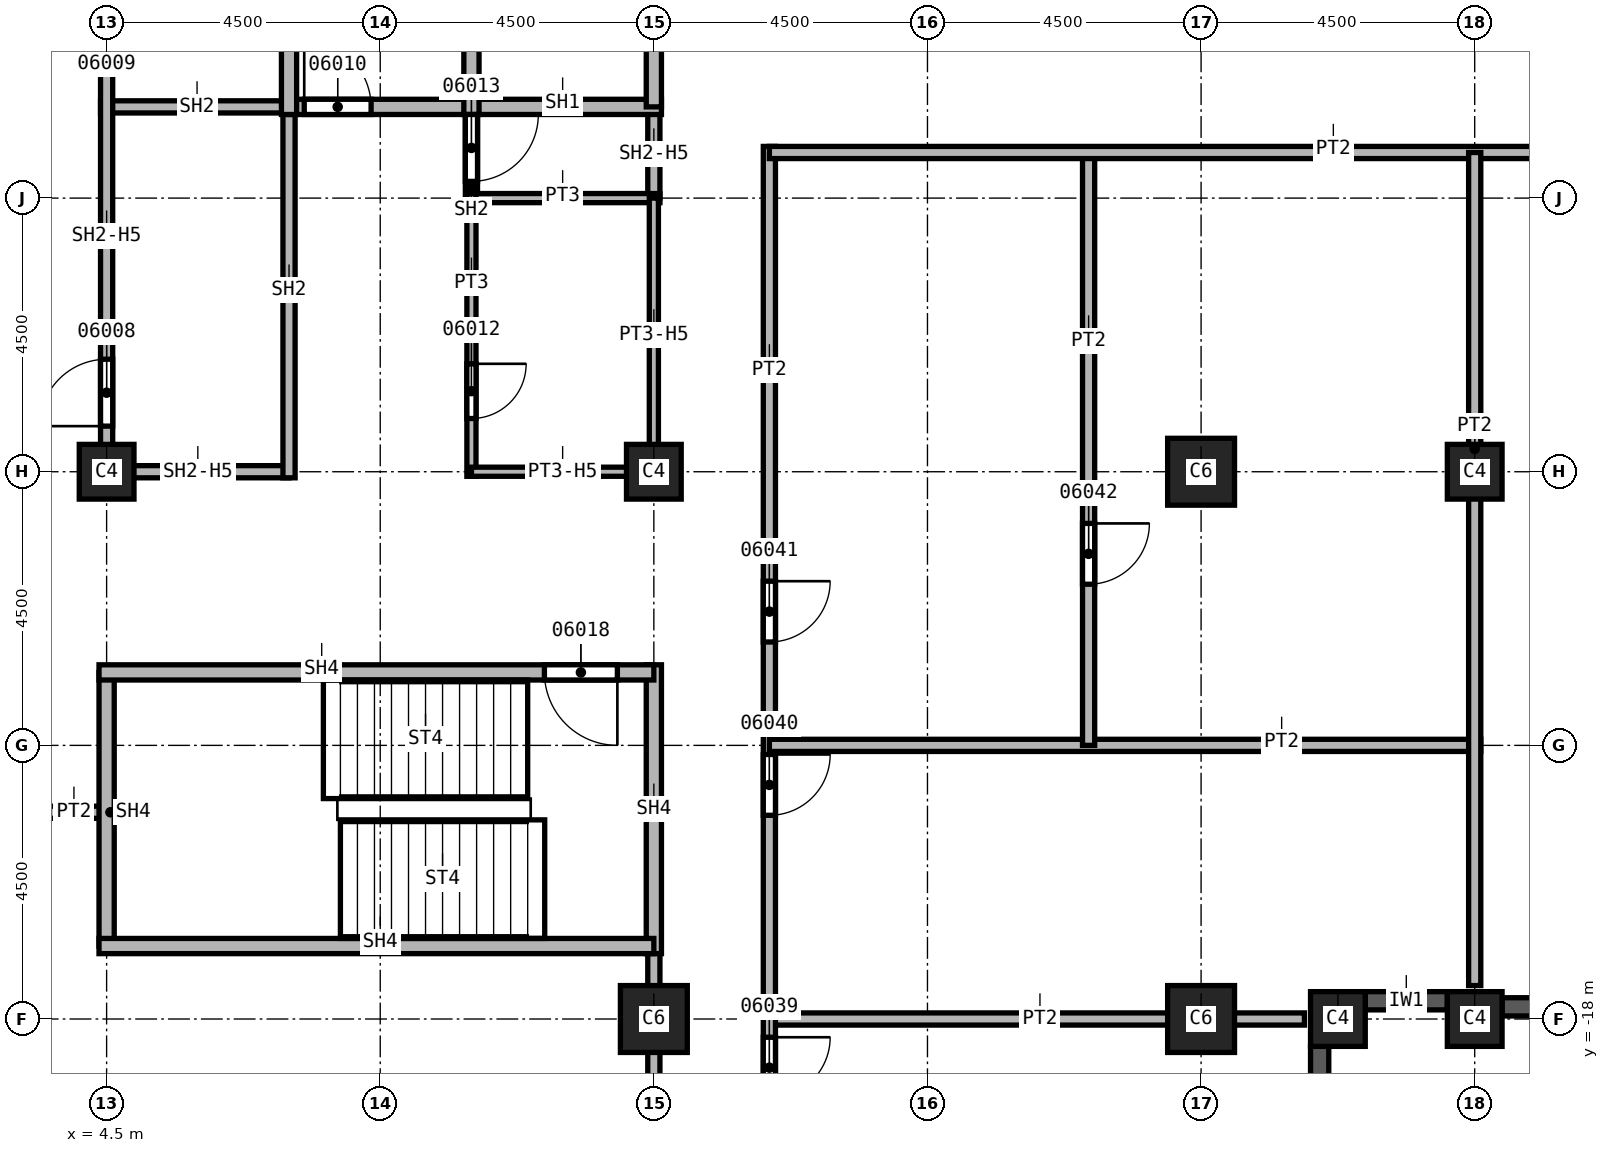
"""IFC4 building model, lengths in metres.
Left out: names, types, materials, properties, quantities, classifications, styles, units other than length and angle.
Written with IfcOpenShell. Run it as: python <this file> out.ifc"""

import sys

from ifc_helpers import new_model, si_unit, direction, frame, frame_2d, origin, origin_2d, place, context, subcontext, project, spatial, rectangle, extrude, element, fill, save


model = new_model("IFC4")
c1 = context("Model", 3, precision=1e-05, world=origin(), true_north=direction((0.0, 1.0)))
c2 = subcontext(c1, "Body", "Model", "MODEL_VIEW")
j1 = project(units=[si_unit("LENGTHUNIT", "METRE"), si_unit("PLANEANGLEUNIT", "RADIAN")], contexts=[c1])
p1 = place(None, origin())
s1 = spatial("IfcSite", under=j1, at=p1, CompositionType="ELEMENT")
p2 = place(p1, origin())
s2 = spatial("IfcBuilding", under=s1, at=p2, CompositionType="ELEMENT")
p3 = place(p2, frame((0.0, 0.0, 130.0)))
s3 = spatial("IfcBuildingStorey", under=s2, at=p3, CompositionType="ELEMENT", Elevation=130.0)
for number, where, z_axis, x_axis in (
    (1, (13.5, -18.0, 0.0), (0.0, 0.0, 1.0), (1.0, 0.0, 0.0)),
    (2, (22.5, -9.0, 0.0), (0.0, 0.0, 1.0), (1.0, 0.0, 0.0)),
    (3, (22.5, -18.0, 0.0), (0.0, 0.0, 1.0), (1.0, 0.0, 0.0)),
):
    element("IfcColumn", number, at=place(p3, frame(where, z_axis=z_axis, x_axis=x_axis)), inside=s3, PredefinedType="COLUMN", context=c2, shape_type="SweptSolid", body=[
        extrude(rectangle(XDim=1.1, YDim=1.1, at=origin_2d()), origin(), (0.0, 0.0, 1.0), 3.7),
    ])
for number, where, z_axis, x_axis in (
    (4, (4.5, -9.0, 0.0), (0.0, 0.0, 1.0), (1.0, 0.0, 0.0)),
    (5, (13.5, -9.0, 0.0), (0.0, 0.0, 1.0), (1.0, 0.0, 0.0)),
    (6, (27.0, -9.0, 0.0), (0.0, 0.0, 1.0), (1.0, 0.0, 0.0)),
    (7, (27.0, -18.0, 0.0), (0.0, 0.0, 1.0), (1.0, 0.0, 0.0)),
    (8, (24.75, -18.0, 0.0), (0.0, 0.0, 1.0), (1.0, 0.0, 0.0)),
):
    element("IfcColumn", number, at=place(p3, frame(where, z_axis=z_axis, x_axis=x_axis)), inside=s3, PredefinedType="COLUMN", context=c2, shape_type="SweptSolid", body=[
        extrude(rectangle(XDim=0.9, YDim=0.9, at=origin_2d()), origin(), (0.0, 0.0, 1.0), 3.7),
    ])
p4 = place(p3, frame((24.45, -20.35, 0.0), z_axis=(0.0, 0.0, 1.0), x_axis=(0.0, 1.0, 0.0)))
e9 = element("IfcWall", 9, at=p4, inside=s3, PredefinedType="SOLIDWALL", context=c2, shape_type="SweptSolid", body=[
    extrude(rectangle(XDim=1.9, YDim=0.3, at=frame_2d((0.95, 0.0))), origin(), (0.0, 0.0, 1.0), 3.1),
])
p5 = place(p3, frame((25.2, -17.7, 0.0), z_axis=(0.0, 0.0, 1.0), x_axis=(1.0, 0.0, 0.0)))
e10 = element("IfcWall", 10, at=p5, inside=s3, PredefinedType="SOLIDWALL", context=c2, shape_type="SweptSolid", body=[
    extrude(rectangle(XDim=1.35, YDim=0.3, at=frame_2d((0.675, 0.0))), origin(), (0.0, 0.0, 1.0), 3.1),
])
p6 = place(p3, frame((27.45, -17.8, 0.0), z_axis=(0.0, 0.0, 1.0), x_axis=(1.0, 0.0, 0.0)))
e11 = element("IfcWall", 11, at=p6, inside=s3, PredefinedType="SOLIDWALL", context=c2, shape_type="SweptSolid", body=[
    extrude(rectangle(XDim=3.6, YDim=0.3, at=frame_2d((1.8, 0.0))), origin(), (0.0, 0.0, 1.0), 3.1),
])
p7 = place(p6, frame((0.6, 0.0, 0.8)))
e12 = element("IfcOpeningElement", 12, at=p7, cuts=e11, PredefinedType="OPENING", context=c2, shape_type="SweptSolid", body=[
    extrude(rectangle(XDim=2.4, YDim=1.95, at=frame_2d((1.2, 0.975))), frame((0.0, 0.15, 0.0), z_axis=(0.0, -1.0, 0.0), x_axis=(1.0, 0.0, 0.0)), (0.0, 0.0, 1.0), 0.3),
])
p8 = place(p3, frame((4.5, -14.6, 0.0), z_axis=(0.0, 0.0, 1.0), x_axis=(-1.0, 0.0, 0.0)))
e13 = element("IfcWall", 13, at=p8, inside=s3, PredefinedType="PARTITIONING", context=c2, shape_type="SweptSolid", body=[
    extrude(rectangle(XDim=0.95, YDim=0.2, at=frame_2d((0.475, 0.0))), origin(), (0.0, 0.0, 1.0), 3.7),
])
p9 = place(p3, frame((13.5, -23.05, 0.0), z_axis=(0.0, 0.0, 1.0), x_axis=(0.0, 1.0, 0.0)))
e14 = element("IfcWall", 14, at=p9, inside=s3, PredefinedType="PARTITIONING", context=c2, shape_type="SweptSolid", body=[
    extrude(rectangle(XDim=6.375, YDim=0.2, at=frame_2d((3.188, 0.0))), origin(), (0.0, 0.0, 1.0), 3.7),
])
p10 = place(p9, frame((0.25, 0.0, 0.0)))
e15 = element("IfcOpeningElement", 15, at=p10, cuts=e14, PredefinedType="OPENING", context=c2, shape_type="SweptSolid", body=[
    extrude(rectangle(XDim=1.0, YDim=2.1, at=frame_2d((0.5, 1.05))), frame((0.0, 0.1, 0.0), z_axis=(0.0, -1.0, 0.0), x_axis=(1.0, 0.0, 0.0)), (0.0, 0.0, 1.0), 0.2),
])
p11 = place(p3, frame((15.4, -18.0, 0.0), z_axis=(0.0, 0.0, 1.0), x_axis=(1.0, 0.0, 0.0)))
e16 = element("IfcWall", 16, at=p11, inside=s3, PredefinedType="PARTITIONING", context=c2, shape_type="SweptSolid", body=[
    extrude(rectangle(XDim=8.8, YDim=0.2, at=frame_2d((4.4, 0.0))), origin(), (0.0, 0.0, 1.0), 3.7),
])
p12 = place(p3, frame((15.4, -3.65, 0.0), z_axis=(0.0, 0.0, 1.0), x_axis=(0.0, -1.0, 0.0)))
e17 = element("IfcWall", 17, at=p12, inside=s3, PredefinedType="PARTITIONING", context=c2, shape_type="SweptSolid", body=[
    extrude(rectangle(XDim=19.6, YDim=0.2, at=frame_2d((9.8, 0.0))), origin(), (0.0, 0.0, 1.0), 3.7),
])
p13 = place(p12, frame((14.65, 0.0, 0.0)))
e18 = element("IfcOpeningElement", 18, at=p13, cuts=e17, PredefinedType="OPENING", context=c2, shape_type="SweptSolid", body=[
    extrude(rectangle(XDim=1.0, YDim=2.1, at=frame_2d((0.5, 1.05))), frame((0.0, 0.1, 0.0), z_axis=(0.0, -1.0, 0.0), x_axis=(1.0, 0.0, 0.0)), (0.0, 0.0, 1.0), 0.2),
])
p14 = place(p12, frame((10.0, 0.0, 0.0)))
e19 = element("IfcOpeningElement", 19, at=p14, cuts=e17, PredefinedType="OPENING", context=c2, shape_type="SweptSolid", body=[
    extrude(rectangle(XDim=1.0, YDim=2.1, at=frame_2d((0.5, 1.05))), frame((0.0, 0.1, 0.0), z_axis=(0.0, -1.0, 0.0), x_axis=(1.0, 0.0, 0.0)), (0.0, 0.0, 1.0), 0.2),
])
p15 = place(p12, frame((7.15, 0.0, 0.0)))
e20 = element("IfcOpeningElement", 20, at=p15, cuts=e17, PredefinedType="OPENING", context=c2, shape_type="SweptSolid", body=[
    extrude(rectangle(XDim=1.0, YDim=2.1, at=frame_2d((0.5, 1.05))), frame((0.0, 0.1, 0.0), z_axis=(0.0, -1.0, 0.0), x_axis=(1.0, 0.0, 0.0)), (0.0, 0.0, 1.0), 0.2),
])
p16 = place(p3, frame((15.4, -13.5, 0.0), z_axis=(0.0, 0.0, 1.0), x_axis=(1.0, 0.0, 0.0)))
e21 = element("IfcWall", 21, at=p16, inside=s3, PredefinedType="PARTITIONING", context=c2, shape_type="SweptSolid", body=[
    extrude(rectangle(XDim=11.7, YDim=0.2, at=frame_2d((5.85, 0.0))), origin(), (0.0, 0.0, 1.0), 3.7),
])
p17 = place(p3, frame((20.65, -3.75, 0.0), z_axis=(0.0, 0.0, 1.0), x_axis=(0.0, -1.0, 0.0)))
e22 = element("IfcWall", 22, at=p17, inside=s3, PredefinedType="PARTITIONING", context=c2, shape_type="SweptSolid", body=[
    extrude(rectangle(XDim=9.75, YDim=0.2, at=frame_2d((4.875, 0.0))), origin(), (0.0, 0.0, 1.0), 3.7),
])
p18 = place(p17, frame((6.1, 0.0, 0.0)))
e23 = element("IfcOpeningElement", 23, at=p18, cuts=e22, PredefinedType="OPENING", context=c2, shape_type="SweptSolid", body=[
    extrude(rectangle(XDim=1.0, YDim=2.1, at=frame_2d((0.5, 1.05))), frame((0.0, 0.1, 0.0), z_axis=(0.0, -1.0, 0.0), x_axis=(1.0, 0.0, 0.0)), (0.0, 0.0, 1.0), 0.2),
])
p19 = place(p3, frame((33.85, -3.75, 0.0), z_axis=(0.0, 0.0, 1.0), x_axis=(-1.0, 0.0, 0.0)))
e24 = element("IfcWall", 24, at=p19, inside=s3, PredefinedType="PARTITIONING", context=c2, shape_type="SweptSolid", body=[
    extrude(rectangle(XDim=18.45, YDim=0.2, at=frame_2d((9.225, 0.0))), origin(), (0.0, 0.0, 1.0), 3.7),
])
p20 = place(p3, frame((27.0, -3.75, 0.0), z_axis=(0.0, 0.0, 1.0), x_axis=(0.0, -1.0, 0.0)))
e25 = element("IfcWall", 25, at=p20, inside=s3, PredefinedType="PARTITIONING", context=c2, shape_type="SweptSolid", body=[
    extrude(rectangle(XDim=13.7, YDim=0.2, at=frame_2d((6.85, 0.0))), origin(), (0.0, 0.0, 1.0), 3.7),
])
p21 = place(p3, frame((4.4, -3.0, 0.0), z_axis=(0.0, 0.0, 1.0), x_axis=(1.0, 0.0, 0.0)))
e26 = element("IfcWall", 26, at=p21, inside=s3, PredefinedType="SOLIDWALL", context=c2, shape_type="SweptSolid", body=[
    extrude(rectangle(XDim=3.225, YDim=0.2, at=frame_2d((1.613, 0.0))), origin(), (0.0, 0.0, 1.0), 3.7),
])
p22 = place(p3, frame((4.5, -9.1, 0.0), z_axis=(0.0, 0.0, 1.0), x_axis=(0.0, 1.0, 0.0)))
e27 = element("IfcWall", 27, at=p22, inside=s3, PredefinedType="SOLIDWALL", context=c2, shape_type="SweptSolid", body=[
    extrude(rectangle(XDim=9.1, YDim=0.2, at=frame_2d((4.55, 0.0))), origin(), (0.0, 0.0, 1.0), 2.938),
])
p23 = place(p22, frame((0.85, 0.0, 0.0)))
e28 = element("IfcOpeningElement", 28, at=p23, cuts=e27, PredefinedType="OPENING", context=c2, shape_type="SweptSolid", body=[
    extrude(rectangle(XDim=1.1, YDim=2.1, at=frame_2d((0.55, 1.05))), frame((0.0, 0.1, 0.0), z_axis=(0.0, -1.0, 0.0), x_axis=(1.0, 0.0, 0.0)), (0.0, 0.0, 1.0), 0.2),
])
p24 = place(p22, frame((7.25, 0.0, 0.0)))
e29 = element("IfcOpeningElement", 29, at=p24, cuts=e27, PredefinedType="OPENING", context=c2, shape_type="SweptSolid", body=[
    extrude(rectangle(XDim=1.1, YDim=2.1, at=frame_2d((0.55, 1.05))), frame((0.0, 0.1, 0.0), z_axis=(0.0, -1.0, 0.0), x_axis=(1.0, 0.0, 0.0)), (0.0, 0.0, 1.0), 0.2),
])
p25 = place(p3, frame((7.5, -9.0, 0.0), z_axis=(0.0, 0.0, 1.0), x_axis=(-1.0, 0.0, 0.0)))
e30 = element("IfcWall", 30, at=p25, inside=s3, PredefinedType="SOLIDWALL", context=c2, shape_type="SweptSolid", body=[
    extrude(rectangle(XDim=3.0, YDim=0.2, at=frame_2d((1.5, 0.0))), origin(), (0.0, 0.0, 1.0), 2.938),
])
p26 = place(p3, frame((7.5, -2.875, 0.0), z_axis=(0.0, 0.0, 1.0), x_axis=(0.0, -1.0, 0.0)))
e31 = element("IfcWall", 31, at=p26, inside=s3, PredefinedType="SOLIDWALL", context=c2, shape_type="SweptSolid", body=[
    extrude(rectangle(XDim=6.225, YDim=0.2, at=frame_2d((3.113, 0.0))), origin(), (0.0, 0.0, 1.0), 3.7),
])
p27 = place(p3, frame((10.5, -2.875, 0.0), z_axis=(0.0, 0.0, 1.0), x_axis=(0.0, -1.0, 0.0)))
e32 = element("IfcWall", 32, at=p27, inside=s3, PredefinedType="SOLIDWALL", context=c2, shape_type="SweptSolid", body=[
    extrude(rectangle(XDim=1.7, YDim=0.2, at=frame_2d((0.85, 0.0))), origin(), (0.0, 0.0, 1.0), 3.7),
])
p28 = place(p27, frame((0.25, 0.0, 0.0)))
e33 = element("IfcOpeningElement", 33, at=p28, cuts=e32, PredefinedType="OPENING", context=c2, shape_type="SweptSolid", body=[
    extrude(rectangle(XDim=1.1, YDim=2.1, at=frame_2d((0.55, 1.05))), frame((0.0, 0.1, 0.0), z_axis=(0.0, -1.0, 0.0), x_axis=(1.0, 0.0, 0.0)), (0.0, 0.0, 1.0), 0.2),
])
p29 = place(p3, frame((13.5, -3.0, 0.0), z_axis=(0.0, 0.0, 1.0), x_axis=(0.0, -1.0, 0.0)))
e34 = element("IfcWall", 34, at=p29, inside=s3, PredefinedType="SOLIDWALL", context=c2, shape_type="SweptSolid", body=[
    extrude(rectangle(XDim=1.5, YDim=0.2, at=frame_2d((0.75, 0.0))), origin(), (0.0, 0.0, 1.0), 2.938),
])
p30 = place(p3, frame((7.5, -3.0, 0.0), z_axis=(0.0, 0.0, 1.0), x_axis=(1.0, 0.0, 0.0)))
e35 = element("IfcWall", 35, at=p30, inside=s3, PredefinedType="SOLIDWALL", context=c2, shape_type="SweptSolid", body=[
    extrude(rectangle(XDim=6.125, YDim=0.25, at=frame_2d((3.062, 0.0))), origin(), (0.0, 0.0, 1.0), 3.7),
])
p31 = place(p30, frame((0.25, 0.0, 0.0)))
e36 = element("IfcOpeningElement", 36, at=p31, cuts=e35, PredefinedType="OPENING", context=c2, shape_type="SweptSolid", body=[
    extrude(rectangle(XDim=1.1, YDim=2.1, at=frame_2d((0.55, 1.05))), frame((0.0, 0.125, 0.0), z_axis=(0.0, -1.0, 0.0), x_axis=(1.0, 0.0, 0.0)), (0.0, 0.0, 1.0), 0.25),
])
p32 = place(p3, frame((7.5, 9.125, 0.0), z_axis=(0.0, 0.0, 1.0), x_axis=(0.0, -1.0, 0.0)))
e37 = element("IfcWall", 37, at=p32, inside=s3, PredefinedType="SOLIDWALL", context=c2, shape_type="SweptSolid", body=[
    extrude(rectangle(XDim=12.25, YDim=0.25, at=frame_2d((6.125, 0.0))), origin(), (0.0, 0.0, 1.0), 3.7),
])
p33 = place(p3, frame((10.5, 6.125, 0.0), z_axis=(0.0, 0.0, 1.0), x_axis=(0.0, -1.0, 0.0)))
e38 = element("IfcWall", 38, at=p33, inside=s3, PredefinedType="SOLIDWALL", context=c2, shape_type="SweptSolid", body=[
    extrude(rectangle(XDim=9.25, YDim=0.25, at=frame_2d((4.625, 0.0))), origin(), (0.0, 0.0, 1.0), 3.7),
])
p34 = place(p33, frame((7.075, 0.0, 0.0)))
e39 = element("IfcOpeningElement", 39, at=p34, cuts=e38, PredefinedType="OPENING", context=c2, shape_type="SweptSolid", body=[
    extrude(rectangle(XDim=1.1, YDim=2.1, at=frame_2d((0.55, 1.05))), frame((0.0, 0.125, 0.0), z_axis=(0.0, -1.0, 0.0), x_axis=(1.0, 0.0, 0.0)), (0.0, 0.0, 1.0), 0.25),
])
p35 = place(p33, frame((4.075, 0.0, 0.0)))
e40 = element("IfcOpeningElement", 40, at=p35, cuts=e38, PredefinedType="OPENING", context=c2, shape_type="SweptSolid", body=[
    extrude(rectangle(XDim=1.1, YDim=2.1, at=frame_2d((0.55, 1.05))), frame((0.0, 0.125, 0.0), z_axis=(0.0, -1.0, 0.0), x_axis=(1.0, 0.0, 0.0)), (0.0, 0.0, 1.0), 0.25),
])
p36 = place(p3, frame((13.5, 6.0, 0.0), z_axis=(0.0, 0.0, 1.0), x_axis=(0.0, -1.0, 0.0)))
e41 = element("IfcWall", 41, at=p36, inside=s3, PredefinedType="SOLIDWALL", context=c2, shape_type="SweptSolid", body=[
    extrude(rectangle(XDim=9.0, YDim=0.25, at=frame_2d((4.5, 0.0))), origin(), (0.0, 0.0, 1.0), 2.938),
])
p37 = place(p3, frame((4.5, -16.8, 0.0), z_axis=(0.0, 0.0, 1.0), x_axis=(0.0, 1.0, 0.0)))
e42 = element("IfcWall", 42, at=p37, inside=s3, PredefinedType="SOLIDWALL", context=c2, shape_type="SweptSolid", body=[
    extrude(rectangle(XDim=4.5, YDim=0.25, at=frame_2d((2.25, 0.0))), origin(), (0.0, 0.0, 1.0), 3.7),
])
p38 = place(p3, frame((13.5, -16.925, 0.0), z_axis=(0.0, 0.0, 1.0), x_axis=(0.0, 1.0, 0.0)))
e43 = element("IfcWall", 43, at=p38, inside=s3, PredefinedType="SOLIDWALL", context=c2, shape_type="SweptSolid", body=[
    extrude(rectangle(XDim=4.75, YDim=0.25, at=frame_2d((2.375, 0.0))), origin(), (0.0, 0.0, 1.0), 3.7),
])
p39 = place(p3, frame((13.5, -16.8, 0.0), z_axis=(0.0, 0.0, 1.0), x_axis=(-1.0, 0.0, 0.0)))
e44 = element("IfcWall", 44, at=p39, inside=s3, PredefinedType="SOLIDWALL", context=c2, shape_type="SweptSolid", body=[
    extrude(rectangle(XDim=9.125, YDim=0.25, at=frame_2d((4.562, 0.0))), origin(), (0.0, 0.0, 1.0), 3.7),
])
p40 = place(p3, frame((13.5, -12.3, 0.0), z_axis=(0.0, 0.0, 1.0), x_axis=(-1.0, 0.0, 0.0)))
e45 = element("IfcWall", 45, at=p40, inside=s3, PredefinedType="SOLIDWALL", context=c2, shape_type="SweptSolid", body=[
    extrude(rectangle(XDim=9.125, YDim=0.25, at=frame_2d((4.562, 0.0))), origin(), (0.0, 0.0, 1.0), 3.7),
])
p41 = place(p40, frame((0.6, 0.0, 0.0)))
e46 = element("IfcOpeningElement", 46, at=p41, cuts=e45, PredefinedType="OPENING", context=c2, shape_type="SweptSolid", body=[
    extrude(rectangle(XDim=1.2, YDim=2.1, at=frame_2d((0.6, 1.05))), frame((0.0, 0.125, 0.0), z_axis=(0.0, -1.0, 0.0), x_axis=(1.0, 0.0, 0.0)), (0.0, 0.0, 1.0), 0.25),
])
p42 = place(p3, frame((10.5, -4.5, 0.0), z_axis=(0.0, 0.0, 1.0), x_axis=(1.0, 0.0, 0.0)))
e47 = element("IfcWall", 47, at=p42, inside=s3, PredefinedType="PARTITIONING", context=c2, shape_type="SweptSolid", body=[
    extrude(rectangle(XDim=3.1, YDim=0.15, at=frame_2d((1.55, 0.0))), origin(), (0.0, 0.0, 1.0), 3.7),
])
p43 = place(p3, frame((10.5, -4.425, 0.0), z_axis=(0.0, 0.0, 1.0), x_axis=(0.0, -1.0, 0.0)))
e48 = element("IfcWall", 48, at=p43, inside=s3, PredefinedType="PARTITIONING", context=c2, shape_type="SweptSolid", body=[
    extrude(rectangle(XDim=4.65, YDim=0.15, at=frame_2d((2.325, 0.0))), origin(), (0.0, 0.0, 1.0), 3.7),
])
p44 = place(p43, frame((2.8, 0.0, 0.0)))
e49 = element("IfcOpeningElement", 49, at=p44, cuts=e48, PredefinedType="OPENING", context=c2, shape_type="SweptSolid", body=[
    extrude(rectangle(XDim=0.9, YDim=2.1, at=frame_2d((0.45, 1.05))), frame((0.0, 0.075, 0.0), z_axis=(0.0, -1.0, 0.0), x_axis=(1.0, 0.0, 0.0)), (0.0, 0.0, 1.0), 0.15),
])
p45 = place(p3, frame((13.5, -9.0, 0.0), z_axis=(0.0, 0.0, 1.0), x_axis=(-1.0, 0.0, 0.0)))
e50 = element("IfcWall", 50, at=p45, inside=s3, PredefinedType="PARTITIONING", context=c2, shape_type="SweptSolid", body=[
    extrude(rectangle(XDim=3.0, YDim=0.15, at=frame_2d((1.5, 0.0))), origin(), (0.0, 0.0, 1.0), 2.938),
])
p46 = place(p3, frame((13.5, -4.5, 0.0), z_axis=(0.0, 0.0, 1.0), x_axis=(0.0, -1.0, 0.0)))
e51 = element("IfcWall", 51, at=p46, inside=s3, PredefinedType="PARTITIONING", context=c2, shape_type="SweptSolid", body=[
    extrude(rectangle(XDim=4.575, YDim=0.15, at=frame_2d((2.288, 0.0))), origin(), (0.0, 0.0, 1.0), 2.938),
])
p47 = place(p23, origin())
e52 = element("IfcDoor", 52, at=p47, inside=s3, OperationType="SINGLE_SWING_LEFT", PredefinedType="DOOR", context=c2, shape_type="SweptSolid", body=[
    extrude(rectangle(XDim=1.1, YDim=2.1, at=frame_2d((0.55, 1.05))), frame((0.0, 0.025, 0.0), z_axis=(0.0, -1.0, 0.0), x_axis=(1.0, 0.0, 0.0)), (0.0, 0.0, 1.0), 0.05),
])
fill(e28, e52)
p48 = place(p31, origin())
e53 = element("IfcDoor", 53, at=p48, inside=s3, OperationType="SINGLE_SWING_LEFT", PredefinedType="DOOR", context=c2, shape_type="SweptSolid", body=[
    extrude(rectangle(XDim=1.1, YDim=2.1, at=frame_2d((0.55, 1.05))), frame((0.0, 0.025, 0.0), z_axis=(0.0, -1.0, 0.0), x_axis=(1.0, 0.0, 0.0)), (0.0, 0.0, 1.0), 0.05),
])
fill(e36, e53)
p49 = place(p44, origin())
e54 = element("IfcDoor", 54, at=p49, inside=s3, OperationType="SINGLE_SWING_LEFT", PredefinedType="DOOR", context=c2, shape_type="SweptSolid", body=[
    extrude(rectangle(XDim=0.9, YDim=2.1, at=frame_2d((0.45, 1.05))), frame((0.0, 0.025, 0.0), z_axis=(0.0, -1.0, 0.0), x_axis=(1.0, 0.0, 0.0)), (0.0, 0.0, 1.0), 0.05),
])
fill(e49, e54)
p50 = place(p28, origin())
e55 = element("IfcDoor", 55, at=p50, inside=s3, OperationType="SINGLE_SWING_RIGHT", PredefinedType="DOOR", context=c2, shape_type="SweptSolid", body=[
    extrude(rectangle(XDim=1.1, YDim=2.1, at=frame_2d((0.55, 1.05))), frame((0.0, 0.025, 0.0), z_axis=(0.0, -1.0, 0.0), x_axis=(1.0, 0.0, 0.0)), (0.0, 0.0, 1.0), 0.05),
])
fill(e33, e55)
p51 = place(p41, origin())
e56 = element("IfcDoor", 56, at=p51, inside=s3, OperationType="SINGLE_SWING_LEFT", PredefinedType="DOOR", context=c2, shape_type="SweptSolid", body=[
    extrude(rectangle(XDim=1.2, YDim=2.1, at=frame_2d((0.6, 1.05))), frame((0.0, 0.025, 0.0), z_axis=(0.0, -1.0, 0.0), x_axis=(1.0, 0.0, 0.0)), (0.0, 0.0, 1.0), 0.05),
])
fill(e46, e56)
p52 = place(p13, origin())
e57 = element("IfcDoor", 57, at=p52, inside=s3, OperationType="SINGLE_SWING_RIGHT", PredefinedType="DOOR", context=c2, shape_type="SweptSolid", body=[
    extrude(rectangle(XDim=1.0, YDim=2.1, at=frame_2d((0.5, 1.05))), frame((0.0, 0.025, 0.0), z_axis=(0.0, -1.0, 0.0), x_axis=(1.0, 0.0, 0.0)), (0.0, 0.0, 1.0), 0.05),
])
fill(e18, e57)
p53 = place(p14, origin())
e58 = element("IfcDoor", 58, at=p53, inside=s3, OperationType="SINGLE_SWING_LEFT", PredefinedType="DOOR", context=c2, shape_type="SweptSolid", body=[
    extrude(rectangle(XDim=1.0, YDim=2.1, at=frame_2d((0.5, 1.05))), frame((0.0, 0.025, 0.0), z_axis=(0.0, -1.0, 0.0), x_axis=(1.0, 0.0, 0.0)), (0.0, 0.0, 1.0), 0.05),
])
fill(e19, e58)
p54 = place(p15, origin())
e59 = element("IfcDoor", 59, at=p54, inside=s3, OperationType="SINGLE_SWING_RIGHT", PredefinedType="DOOR", context=c2, shape_type="SweptSolid", body=[
    extrude(rectangle(XDim=1.0, YDim=2.1, at=frame_2d((0.5, 1.05))), frame((0.0, 0.025, 0.0), z_axis=(0.0, -1.0, 0.0), x_axis=(1.0, 0.0, 0.0)), (0.0, 0.0, 1.0), 0.05),
])
fill(e20, e59)
p55 = place(p18, origin())
e60 = element("IfcDoor", 60, at=p55, inside=s3, OperationType="SINGLE_SWING_LEFT", PredefinedType="DOOR", context=c2, shape_type="SweptSolid", body=[
    extrude(rectangle(XDim=1.0, YDim=2.1, at=frame_2d((0.5, 1.05))), frame((0.0, 0.025, 0.0), z_axis=(0.0, -1.0, 0.0), x_axis=(1.0, 0.0, 0.0)), (0.0, 0.0, 1.0), 0.05),
])
fill(e23, e60)
save(model, sys.argv[1])
